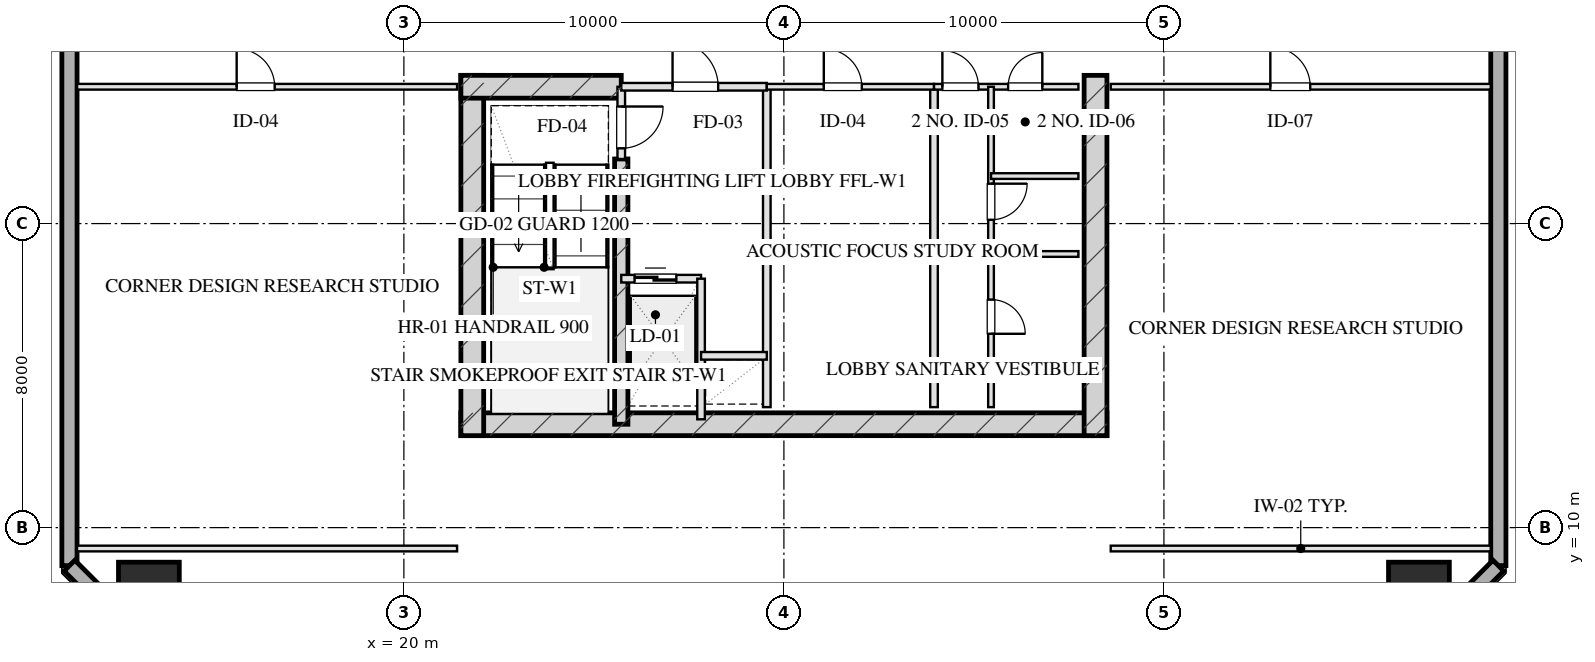
"""IFC4 building model, lengths in metres.
Left out: names, types, materials, properties, quantities, classifications, styles, units other than length and angle.
Written with IfcOpenShell. Run it as: python <this file> out.ifc"""

import sys

from ifc_helpers import new_model, si_unit, direction, frame, frame_2d, origin, origin_2d, place, context, subcontext, project, spatial, rectangle, hollow_rectangle, extrude, element, fill, save


model = new_model("IFC4")
c1 = context("Model", 3, precision=1e-05, world=origin(), true_north=direction((0.0, 1.0)))
c2 = subcontext(c1, "Body", "Model", "MODEL_VIEW")
j1 = project(units=[si_unit("LENGTHUNIT", "METRE"), si_unit("PLANEANGLEUNIT", "RADIAN")], contexts=[c1])
p1 = place(None, origin())
s1 = spatial("IfcSite", under=j1, at=p1, CompositionType="ELEMENT")
p2 = place(p1, origin())
s2 = spatial("IfcBuilding", under=s1, at=p2, CompositionType="ELEMENT")
p3 = place(p2, frame((0.0, 0.0, 127.65)))
s3 = spatial("IfcBuildingStorey", under=s2, at=p3, CompositionType="ELEMENT", Elevation=127.65)
p4 = place(p3, frame((21.5, 12.72, 0.0), z_axis=(0.0, 0.0, 1.0), x_axis=(1.0, 0.0, 0.0)))
e1 = element("IfcWall", 1, at=p4, inside=s3, PredefinedType="SHEAR", context=c2, shape_type="SweptSolid", body=[
    extrude(rectangle(XDim=17.0, YDim=0.6, at=frame_2d((8.5, 0.0))), origin(), (0.0, 0.0, 1.0), 3.45),
])
for number, where, z_axis, x_axis in (
    (2, (21.8, 21.9, 0.0), (0.0, 0.0, 1.0), (0.0, -1.0, 0.0)),
    (3, (38.2, 21.9, 0.0), (0.0, 0.0, 1.0), (0.0, -1.0, 0.0)),
):
    element("IfcWall", number, at=place(p3, frame(where, z_axis=z_axis, x_axis=x_axis)), inside=s3, PredefinedType="SHEAR", context=c2, shape_type="SweptSolid", body=[
        extrude(rectangle(XDim=9.48, YDim=0.6, at=frame_2d((4.74, 0.0))), origin(), (0.0, 0.0, 1.0), 3.45),
    ])
p5 = place(p3, frame((25.72, 19.7, 0.0), z_axis=(0.0, 0.0, 1.0), x_axis=(0.0, -1.0, 0.0)))
e4 = element("IfcWall", 4, at=p5, inside=s3, PredefinedType="SHEAR", context=c2, shape_type="SweptSolid", body=[
    extrude(rectangle(XDim=6.98, YDim=0.35, at=frame_2d((3.49, 0.0))), origin(), (0.0, 0.0, 1.0), 3.45),
])
p6 = place(p3, frame((21.5, 21.6, 0.0), z_axis=(0.0, 0.0, 1.0), x_axis=(1.0, 0.0, 0.0)))
e5 = element("IfcWall", 5, at=p6, inside=s3, PredefinedType="SHEAR", context=c2, shape_type="SweptSolid", body=[
    extrude(rectangle(XDim=4.22, YDim=0.6, at=frame_2d((2.11, 0.0))), origin(), (0.0, 0.0, 1.0), 3.45),
])
for number, where, z_axis, x_axis in (
    (6, (13.29, 8.29, 0.0), (0.0, 0.0, 1.0), (1.0, 0.0, 0.0)),
    (7, (46.71, 8.29, 0.0), (0.0, 0.0, 1.0), (1.0, 0.0, 0.0)),
):
    element("IfcColumn", number, at=place(p3, frame(where, z_axis=z_axis, x_axis=x_axis)), inside=s3, PredefinedType="COLUMN", context=c2, shape_type="SweptSolid", body=[
        extrude(hollow_rectangle(XDim=1.6, YDim=1.6, WallThickness=0.055, at=origin_2d()), origin(), (0.0, 0.0, 1.0), 3.451),
    ])
p7 = place(p3, frame((11.2, 9.0, 0.0), z_axis=(0.0, 0.0, 1.0), x_axis=(0.0, 1.0, 0.0)))
e8 = element("IfcWall", 8, at=p7, inside=s3, PredefinedType="SOLIDWALL", context=c2, shape_type="SweptSolid", body=[
    extrude(rectangle(XDim=50.0, YDim=0.4, at=frame_2d((25.0, 0.0))), origin(), (0.0, 0.0, 1.0), 2.61),
])
p8 = place(p7, frame((17.475, 0.0, 0.75)))
e9 = element("IfcOpeningElement", 9, at=p8, cuts=e8, PredefinedType="OPENING", context=c2, shape_type="SweptSolid", body=[
    extrude(rectangle(XDim=2.25, YDim=1.46, at=frame_2d((1.125, 0.73))), frame((0.0, 0.21, 0.0), z_axis=(0.0, -1.0, 0.0), x_axis=(1.0, 0.0, 0.0)), (0.0, 0.0, 1.0), 0.42),
])
p9 = place(p7, frame((21.275, 0.0, 0.75)))
e10 = element("IfcOpeningElement", 10, at=p9, cuts=e8, PredefinedType="OPENING", context=c2, shape_type="SweptSolid", body=[
    extrude(rectangle(XDim=2.25, YDim=1.46, at=frame_2d((1.125, 0.73))), frame((0.0, 0.21, 0.0), z_axis=(0.0, -1.0, 0.0), x_axis=(1.0, 0.0, 0.0)), (0.0, 0.0, 1.0), 0.42),
])
p10 = place(p7, frame((26.475, 0.0, 0.75)))
e11 = element("IfcOpeningElement", 11, at=p10, cuts=e8, PredefinedType="OPENING", context=c2, shape_type="SweptSolid", body=[
    extrude(rectangle(XDim=2.25, YDim=1.46, at=frame_2d((1.125, 0.73))), frame((0.0, 0.21, 0.0), z_axis=(0.0, -1.0, 0.0), x_axis=(1.0, 0.0, 0.0)), (0.0, 0.0, 1.0), 0.42),
])
p11 = place(p7, frame((30.275, 0.0, 0.75)))
e12 = element("IfcOpeningElement", 12, at=p11, cuts=e8, PredefinedType="OPENING", context=c2, shape_type="SweptSolid", body=[
    extrude(rectangle(XDim=2.25, YDim=1.46, at=frame_2d((1.125, 0.73))), frame((0.0, 0.21, 0.0), z_axis=(0.0, -1.0, 0.0), x_axis=(1.0, 0.0, 0.0)), (0.0, 0.0, 1.0), 0.42),
])
p12 = place(p3, frame((48.8, 59.0, 0.0), z_axis=(0.0, 0.0, 1.0), x_axis=(0.0, -1.0, 0.0)))
e13 = element("IfcWall", 13, at=p12, inside=s3, PredefinedType="SOLIDWALL", context=c2, shape_type="SweptSolid", body=[
    extrude(rectangle(XDim=50.0, YDim=0.4, at=frame_2d((25.0, 0.0))), origin(), (0.0, 0.0, 1.0), 2.61),
])
p13 = place(p12, frame((21.275, 0.0, 0.75)))
e14 = element("IfcOpeningElement", 14, at=p13, cuts=e13, PredefinedType="OPENING", context=c2, shape_type="SweptSolid", body=[
    extrude(rectangle(XDim=2.25, YDim=1.46, at=frame_2d((1.125, 0.73))), frame((0.0, 0.21, 0.0), z_axis=(0.0, -1.0, 0.0), x_axis=(1.0, 0.0, 0.0)), (0.0, 0.0, 1.0), 0.42),
])
p14 = place(p12, frame((17.475, 0.0, 0.75)))
e15 = element("IfcOpeningElement", 15, at=p14, cuts=e13, PredefinedType="OPENING", context=c2, shape_type="SweptSolid", body=[
    extrude(rectangle(XDim=2.25, YDim=1.46, at=frame_2d((1.125, 0.73))), frame((0.0, 0.21, 0.0), z_axis=(0.0, -1.0, 0.0), x_axis=(1.0, 0.0, 0.0)), (0.0, 0.0, 1.0), 0.42),
])
for number, where, z_axis, x_axis in (
    (16, (48.8, 9.0, 0.0), (0.0, 0.0, 1.0), (-0.707, -0.707, 0.0)),
    (17, (14.0, 6.2, 0.0), (0.0, 0.0, 1.0), (-0.707, 0.707, 0.0)),
):
    element("IfcWall", number, at=place(p3, frame(where, z_axis=z_axis, x_axis=x_axis)), inside=s3, PredefinedType="SOLIDWALL", context=c2, shape_type="SweptSolid", body=[
        extrude(rectangle(XDim=3.96, YDim=0.4, at=frame_2d((1.98, 0.0))), origin(), (0.0, 0.0, 1.0), 2.61),
    ])
p15 = place(p3, frame((25.72, 21.6, 0.0), z_axis=(0.0, 0.0, 1.0), x_axis=(0.0, -1.0, 0.0)))
e18 = element("IfcWall", 18, at=p15, inside=s3, PredefinedType="PARTITIONING", context=c2, shape_type="SweptSolid", body=[
    extrude(rectangle(XDim=1.9, YDim=0.2, at=frame_2d((0.95, 0.0))), origin(), (0.0, 0.0, 1.0), 3.175),
])
p16 = place(p15, frame((0.52, 0.0, 0.0)))
e19 = element("IfcOpeningElement", 19, at=p16, cuts=e18, PredefinedType="OPENING", context=c2, shape_type="SweptSolid", body=[
    extrude(rectangle(XDim=1.1, YDim=2.05, at=frame_2d((0.55, 1.025))), frame((0.0, 0.11, 0.0), z_axis=(0.0, -1.0, 0.0), x_axis=(1.0, 0.0, 0.0)), (0.0, 0.0, 1.0), 0.22),
])
p17 = place(p3, frame((29.55, 21.6, 0.0), z_axis=(0.0, 0.0, 1.0), x_axis=(0.0, -1.0, 0.0)))
e20 = element("IfcWall", 20, at=p17, inside=s3, PredefinedType="PARTITIONING", context=c2, shape_type="SweptSolid", body=[
    extrude(rectangle(XDim=8.43, YDim=0.2, at=frame_2d((4.215, 0.0))), origin(), (0.0, 0.0, 1.0), 3.175),
])
p18 = place(p3, frame((25.72, 21.6, 0.0), z_axis=(0.0, 0.0, 1.0), x_axis=(1.0, 0.0, 0.0)))
e21 = element("IfcWall", 21, at=p18, inside=s3, PredefinedType="PARTITIONING", context=c2, shape_type="SweptSolid", body=[
    extrude(rectangle(XDim=3.83, YDim=0.2, at=frame_2d((1.915, 0.0))), origin(), (0.0, 0.0, 1.0), 3.175),
])
p19 = place(p18, frame((1.35, 0.0, 0.0)))
e22 = element("IfcOpeningElement", 22, at=p19, cuts=e21, PredefinedType="OPENING", context=c2, shape_type="SweptSolid", body=[
    extrude(rectangle(XDim=1.2, YDim=2.05, at=frame_2d((0.6, 1.025))), frame((0.0, 0.11, 0.0), z_axis=(0.0, -1.0, 0.0), x_axis=(1.0, 0.0, 0.0)), (0.0, 0.0, 1.0), 0.22),
])
p20 = place(p3, frame((25.72, 16.55, 0.0), z_axis=(0.0, 0.0, 1.0), x_axis=(1.0, 0.0, 0.0)))
e23 = element("IfcWall", 23, at=p20, inside=s3, PredefinedType="PARTITIONING", context=c2, shape_type="SweptSolid", body=[
    extrude(rectangle(XDim=2.1, YDim=0.2, at=frame_2d((1.05, 0.0))), origin(), (0.0, 0.0, 1.0), 3.175),
])
p21 = place(p20, frame((0.35, 0.0, 0.0)))
e24 = element("IfcOpeningElement", 24, at=p21, cuts=e23, PredefinedType="OPENING", context=c2, shape_type="SweptSolid", body=[
    extrude(rectangle(XDim=1.1, YDim=2.05, at=frame_2d((0.55, 1.025))), frame((0.0, 0.11, 0.0), z_axis=(0.0, -1.0, 0.0), x_axis=(1.0, 0.0, 0.0)), (0.0, 0.0, 1.0), 0.22),
])
p22 = place(p3, frame((27.82, 16.55, 0.0), z_axis=(0.0, 0.0, 1.0), x_axis=(0.0, -1.0, 0.0)))
e25 = element("IfcWall", 25, at=p22, inside=s3, PredefinedType="PARTITIONING", context=c2, shape_type="SweptSolid", body=[
    extrude(rectangle(XDim=3.7, YDim=0.2, at=frame_2d((1.85, 0.0))), origin(), (0.0, 0.0, 1.0), 3.175),
])
p23 = place(p3, frame((27.82, 14.52, 0.0), z_axis=(0.0, 0.0, 1.0), x_axis=(1.0, 0.0, 0.0)))
e26 = element("IfcWall", 26, at=p23, inside=s3, PredefinedType="PARTITIONING", context=c2, shape_type="SweptSolid", body=[
    extrude(rectangle(XDim=1.73, YDim=0.2, at=frame_2d((0.865, 0.0))), origin(), (0.0, 0.0, 1.0), 3.175),
])
p24 = place(p3, frame((33.95, 21.6, 0.0), z_axis=(0.0, 0.0, 1.0), x_axis=(0.0, -1.0, 0.0)))
e27 = element("IfcWall", 27, at=p24, inside=s3, PredefinedType="PARTITIONING", context=c2, shape_type="SweptSolid", body=[
    extrude(rectangle(XDim=8.43, YDim=0.2, at=frame_2d((4.215, 0.0))), origin(), (0.0, 0.0, 1.0), 3.175),
])
p25 = place(p3, frame((29.55, 21.6, 0.0), z_axis=(0.0, 0.0, 1.0), x_axis=(1.0, 0.0, 0.0)))
e28 = element("IfcWall", 28, at=p25, inside=s3, PredefinedType="PARTITIONING", context=c2, shape_type="SweptSolid", body=[
    extrude(rectangle(XDim=4.4, YDim=0.15, at=frame_2d((2.2, 0.0))), origin(), (0.0, 0.0, 1.0), 3.175),
])
p26 = place(p25, frame((1.5, 0.0, 0.0)))
e29 = element("IfcOpeningElement", 29, at=p26, cuts=e28, PredefinedType="OPENING", context=c2, shape_type="SweptSolid", body=[
    extrude(rectangle(XDim=1.0, YDim=2.05, at=frame_2d((0.5, 1.025))), frame((0.0, 0.085, 0.0), z_axis=(0.0, -1.0, 0.0), x_axis=(1.0, 0.0, 0.0)), (0.0, 0.0, 1.0), 0.17),
])
p27 = place(p3, frame((29.55, 17.3, 0.0), z_axis=(0.0, 0.0, 1.0), x_axis=(1.0, 0.0, 0.0)))
e30 = element("IfcWall", 30, at=p27, inside=s3, PredefinedType="PARTITIONING", context=c2, shape_type="SweptSolid", body=[
    extrude(rectangle(XDim=4.4, YDim=0.15, at=frame_2d((2.2, 0.0))), origin(), (0.0, 0.0, 1.0), 3.175),
])
p28 = place(p3, frame((33.95, 21.6, 0.0), z_axis=(0.0, 0.0, 1.0), x_axis=(1.0, 0.0, 0.0)))
e31 = element("IfcWall", 31, at=p28, inside=s3, PredefinedType="PARTITIONING", context=c2, shape_type="SweptSolid", body=[
    extrude(rectangle(XDim=3.8, YDim=0.15, at=frame_2d((1.9, 0.0))), origin(), (0.0, 0.0, 1.0), 3.175),
])
p29 = place(p28, frame((0.22, 0.0, 0.0)))
e32 = element("IfcOpeningElement", 32, at=p29, cuts=e31, PredefinedType="OPENING", context=c2, shape_type="SweptSolid", body=[
    extrude(rectangle(XDim=0.95, YDim=2.05, at=frame_2d((0.475, 1.025))), frame((0.0, 0.085, 0.0), z_axis=(0.0, -1.0, 0.0), x_axis=(1.0, 0.0, 0.0)), (0.0, 0.0, 1.0), 0.17),
])
p30 = place(p28, frame((1.95, 0.0, 0.0)))
e33 = element("IfcOpeningElement", 33, at=p30, cuts=e31, PredefinedType="OPENING", context=c2, shape_type="SweptSolid", body=[
    extrude(rectangle(XDim=0.9, YDim=2.05, at=frame_2d((0.45, 1.025))), frame((0.0, 0.085, 0.0), z_axis=(0.0, -1.0, 0.0), x_axis=(1.0, 0.0, 0.0)), (0.0, 0.0, 1.0), 0.17),
])
p31 = place(p3, frame((35.45, 21.6, 0.0), z_axis=(0.0, 0.0, 1.0), x_axis=(0.0, -1.0, 0.0)))
e34 = element("IfcWall", 34, at=p31, inside=s3, PredefinedType="PARTITIONING", context=c2, shape_type="SweptSolid", body=[
    extrude(rectangle(XDim=8.43, YDim=0.15, at=frame_2d((4.215, 0.0))), origin(), (0.0, 0.0, 1.0), 2.815),
])
p32 = place(p31, frame((2.55, 0.0, 0.0)))
e35 = element("IfcOpeningElement", 35, at=p32, cuts=e34, PredefinedType="OPENING", context=c2, shape_type="SweptSolid", body=[
    extrude(rectangle(XDim=0.95, YDim=2.05, at=frame_2d((0.475, 1.025))), frame((0.0, 0.085, 0.0), z_axis=(0.0, -1.0, 0.0), x_axis=(1.0, 0.0, 0.0)), (0.0, 0.0, 1.0), 0.17),
])
p33 = place(p31, frame((5.6, 0.0, 0.0)))
e36 = element("IfcOpeningElement", 36, at=p33, cuts=e34, PredefinedType="OPENING", context=c2, shape_type="SweptSolid", body=[
    extrude(rectangle(XDim=0.9, YDim=2.05, at=frame_2d((0.45, 1.025))), frame((0.0, 0.085, 0.0), z_axis=(0.0, -1.0, 0.0), x_axis=(1.0, 0.0, 0.0)), (0.0, 0.0, 1.0), 0.17),
])
for number, where, z_axis, x_axis in (
    (37, (35.45, 17.2, 0.0), (0.0, 0.0, 1.0), (1.0, 0.0, 0.0)),
    (38, (35.45, 19.25, 0.0), (0.0, 0.0, 1.0), (1.0, 0.0, 0.0)),
):
    element("IfcWall", number, at=place(p3, frame(where, z_axis=z_axis, x_axis=x_axis)), inside=s3, PredefinedType="PARTITIONING", context=c2, shape_type="SweptSolid", body=[
        extrude(rectangle(XDim=2.3, YDim=0.15, at=frame_2d((1.15, 0.0))), origin(), (0.0, 0.0, 1.0), 3.175),
    ])
p34 = place(p3, frame((11.4, 9.45, 0.0), z_axis=(0.0, 0.0, 1.0), x_axis=(1.0, 0.0, 0.0)))
e39 = element("IfcWall", 39, at=p34, inside=s3, PredefinedType="PARTITIONING", context=c2, shape_type="SweptSolid", body=[
    extrude(rectangle(XDim=10.0, YDim=0.15, at=frame_2d((5.0, 0.0))), origin(), (0.0, 0.0, 1.0), 3.175),
])
p35 = place(p3, frame((11.4, 21.6, 0.0), z_axis=(0.0, 0.0, 1.0), x_axis=(1.0, 0.0, 0.0)))
e40 = element("IfcWall", 40, at=p35, inside=s3, PredefinedType="PARTITIONING", context=c2, shape_type="SweptSolid", body=[
    extrude(rectangle(XDim=10.0, YDim=0.15, at=frame_2d((5.0, 0.0))), origin(), (0.0, 0.0, 1.0), 3.175),
])
p36 = place(p35, frame((4.2, 0.0, 0.0)))
e41 = element("IfcOpeningElement", 41, at=p36, cuts=e40, PredefinedType="OPENING", context=c2, shape_type="SweptSolid", body=[
    extrude(rectangle(XDim=1.0, YDim=2.05, at=frame_2d((0.5, 1.025))), frame((0.0, 0.085, 0.0), z_axis=(0.0, -1.0, 0.0), x_axis=(1.0, 0.0, 0.0)), (0.0, 0.0, 1.0), 0.17),
])
p37 = place(p3, frame((38.6, 9.45, 0.0), z_axis=(0.0, 0.0, 1.0), x_axis=(1.0, 0.0, 0.0)))
e42 = element("IfcWall", 42, at=p37, inside=s3, PredefinedType="PARTITIONING", context=c2, shape_type="SweptSolid", body=[
    extrude(rectangle(XDim=10.0, YDim=0.15, at=frame_2d((5.0, 0.0))), origin(), (0.0, 0.0, 1.0), 3.175),
])
p38 = place(p3, frame((38.6, 21.6, 0.0), z_axis=(0.0, 0.0, 1.0), x_axis=(1.0, 0.0, 0.0)))
e43 = element("IfcWall", 43, at=p38, inside=s3, PredefinedType="PARTITIONING", context=c2, shape_type="SweptSolid", body=[
    extrude(rectangle(XDim=10.0, YDim=0.15, at=frame_2d((5.0, 0.0))), origin(), (0.0, 0.0, 1.0), 3.175),
])
p39 = place(p38, frame((4.2, 0.0, 0.0)))
e44 = element("IfcOpeningElement", 44, at=p39, cuts=e43, PredefinedType="OPENING", context=c2, shape_type="SweptSolid", body=[
    extrude(rectangle(XDim=1.05, YDim=2.05, at=frame_2d((0.525, 1.025))), frame((0.0, 0.085, 0.0), z_axis=(0.0, -1.0, 0.0), x_axis=(1.0, 0.0, 0.0)), (0.0, 0.0, 1.0), 0.17),
])
p40 = place(p16, origin())
e45 = element("IfcDoor", 45, at=p40, inside=s3, OperationType="SINGLE_SWING_LEFT", PredefinedType="DOOR", context=c2, shape_type="SweptSolid", body=[
    extrude(rectangle(XDim=1.1, YDim=2.05, at=frame_2d((0.55, 1.025))), frame((0.0, 0.025, 0.0), z_axis=(0.0, -1.0, 0.0), x_axis=(1.0, 0.0, 0.0)), (0.0, 0.0, 1.0), 0.05),
])
fill(e19, e45)
p41 = place(p19, origin())
e46 = element("IfcDoor", 46, at=p41, inside=s3, OperationType="SINGLE_SWING_LEFT", PredefinedType="DOOR", context=c2, shape_type="SweptSolid", body=[
    extrude(rectangle(XDim=1.2, YDim=2.05, at=frame_2d((0.6, 1.025))), frame((0.0, 0.025, 0.0), z_axis=(0.0, -1.0, 0.0), x_axis=(1.0, 0.0, 0.0)), (0.0, 0.0, 1.0), 0.05),
])
fill(e22, e46)
p42 = place(p21, origin())
e47 = element("IfcDoor", 47, at=p42, inside=s3, OperationType="DOUBLE_DOOR_SLIDING", PredefinedType="DOOR", context=c2, shape_type="SweptSolid", body=[
    extrude(rectangle(XDim=1.1, YDim=2.05, at=frame_2d((0.55, 1.025))), frame((0.0, 0.025, 0.0), z_axis=(0.0, -1.0, 0.0), x_axis=(1.0, 0.0, 0.0)), (0.0, 0.0, 1.0), 0.05),
])
fill(e24, e47)
p43 = place(p26, origin())
e48 = element("IfcDoor", 48, at=p43, inside=s3, OperationType="SINGLE_SWING_LEFT", PredefinedType="DOOR", context=c2, shape_type="SweptSolid", body=[
    extrude(rectangle(XDim=1.0, YDim=2.05, at=frame_2d((0.5, 1.025))), frame((0.0, 0.025, 0.0), z_axis=(0.0, -1.0, 0.0), x_axis=(1.0, 0.0, 0.0)), (0.0, 0.0, 1.0), 0.05),
])
fill(e29, e48)
p44 = place(p29, origin())
e49 = element("IfcDoor", 49, at=p44, inside=s3, OperationType="SINGLE_SWING_LEFT", PredefinedType="DOOR", context=c2, shape_type="SweptSolid", body=[
    extrude(rectangle(XDim=0.95, YDim=2.05, at=frame_2d((0.475, 1.025))), frame((0.0, 0.025, 0.0), z_axis=(0.0, -1.0, 0.0), x_axis=(1.0, 0.0, 0.0)), (0.0, 0.0, 1.0), 0.05),
])
fill(e32, e49)
p45 = place(p30, origin())
e50 = element("IfcDoor", 50, at=p45, inside=s3, OperationType="SINGLE_SWING_RIGHT", PredefinedType="DOOR", context=c2, shape_type="SweptSolid", body=[
    extrude(rectangle(XDim=0.9, YDim=2.05, at=frame_2d((0.45, 1.025))), frame((0.0, 0.025, 0.0), z_axis=(0.0, -1.0, 0.0), x_axis=(1.0, 0.0, 0.0)), (0.0, 0.0, 1.0), 0.05),
])
fill(e33, e50)
p46 = place(p32, origin())
e51 = element("IfcDoor", 51, at=p46, inside=s3, OperationType="SINGLE_SWING_LEFT", PredefinedType="DOOR", context=c2, shape_type="SweptSolid", body=[
    extrude(rectangle(XDim=0.95, YDim=2.05, at=frame_2d((0.475, 1.025))), frame((0.0, 0.025, 0.0), z_axis=(0.0, -1.0, 0.0), x_axis=(1.0, 0.0, 0.0)), (0.0, 0.0, 1.0), 0.05),
])
fill(e35, e51)
p47 = place(p33, origin())
e52 = element("IfcDoor", 52, at=p47, inside=s3, OperationType="SINGLE_SWING_RIGHT", PredefinedType="DOOR", context=c2, shape_type="SweptSolid", body=[
    extrude(rectangle(XDim=0.9, YDim=2.05, at=frame_2d((0.45, 1.025))), frame((0.0, 0.025, 0.0), z_axis=(0.0, -1.0, 0.0), x_axis=(1.0, 0.0, 0.0)), (0.0, 0.0, 1.0), 0.05),
])
fill(e36, e52)
p48 = place(p36, origin())
e53 = element("IfcDoor", 53, at=p48, inside=s3, OperationType="SINGLE_SWING_LEFT", PredefinedType="DOOR", context=c2, shape_type="SweptSolid", body=[
    extrude(rectangle(XDim=1.0, YDim=2.05, at=frame_2d((0.5, 1.025))), frame((0.0, 0.025, 0.0), z_axis=(0.0, -1.0, 0.0), x_axis=(1.0, 0.0, 0.0)), (0.0, 0.0, 1.0), 0.05),
])
fill(e41, e53)
p49 = place(p39, origin())
e54 = element("IfcDoor", 54, at=p49, inside=s3, OperationType="SINGLE_SWING_LEFT", PredefinedType="DOOR", context=c2, shape_type="SweptSolid", body=[
    extrude(rectangle(XDim=1.05, YDim=2.05, at=frame_2d((0.525, 1.025))), frame((0.0, 0.025, 0.0), z_axis=(0.0, -1.0, 0.0), x_axis=(1.0, 0.0, 0.0)), (0.0, 0.0, 1.0), 0.05),
])
fill(e44, e54)
save(model, sys.argv[1])
